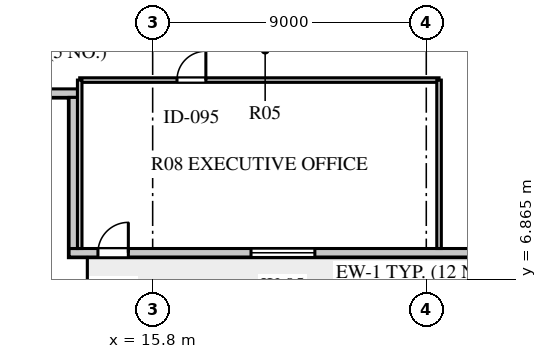
"""IFC4 building model, lengths in metres.
Left out: names, types, materials, properties, quantities, classifications, styles, units other than length and angle.
Written with IfcOpenShell. Run it as: python <this file> out.ifc"""

import sys

from ifc_helpers import new_model, si_unit, direction, frame, frame_2d, origin, place, context, subcontext, project, spatial, rectangle, extrude, element, fill, save


model = new_model("IFC4")
c1 = context("Model", 3, precision=1e-05, world=origin(), true_north=direction((0.0, 1.0)))
c2 = subcontext(c1, "Body", "Model", "MODEL_VIEW")
j1 = project(units=[si_unit("LENGTHUNIT", "METRE"), si_unit("PLANEANGLEUNIT", "RADIAN")], contexts=[c1])
p1 = place(None, origin())
s1 = spatial("IfcSite", under=j1, at=p1, CompositionType="ELEMENT")
p2 = place(p1, origin())
s2 = spatial("IfcBuilding", under=s1, at=p2, CompositionType="ELEMENT")
p3 = place(p2, frame((0.0, 0.0, 237.5)))
s3 = spatial("IfcBuildingStorey", under=s2, at=p3, CompositionType="ELEMENT", Elevation=237.5)
p4 = place(p3, frame((13.05, 7.74, 0.0), z_axis=(0.0, 0.0, 1.0), x_axis=(1.0, 0.0, 0.0)))
e1 = element("IfcWall", 1, at=p4, inside=s3, PredefinedType="STANDARD", context=c2, shape_type="SweptSolid", body=[
    extrude(rectangle(XDim=32.5, YDim=0.28, at=frame_2d((16.25, 0.0))), origin(), (0.0, 0.0, 1.0), 3.66),
])
p5 = place(p4, frame((0.95, 0.0, 0.0)))
e2 = element("IfcOpeningElement", 2, at=p5, cuts=e1, PredefinedType="OPENING", context=c2, shape_type="SweptSolid", body=[
    extrude(rectangle(XDim=1.0, YDim=2.05, at=frame_2d((0.5, 1.025))), frame((0.0, 0.15, 0.0), z_axis=(0.0, -1.0, 0.0), x_axis=(1.0, 0.0, 0.0)), (0.0, 0.0, 1.0), 0.3),
])
p6 = place(p4, frame((5.985, 0.0, 0.8)))
e3 = element("IfcOpeningElement", 3, at=p6, cuts=e1, PredefinedType="OPENING", context=c2, shape_type="SweptSolid", body=[
    extrude(rectangle(XDim=2.1, YDim=1.95, at=frame_2d((1.05, 0.975))), frame((0.0, 0.15, 0.0), z_axis=(0.0, -1.0, 0.0), x_axis=(1.0, 0.0, 0.0)), (0.0, 0.0, 1.0), 0.3),
])
p7 = place(p4, frame((14.877, 0.0, 0.8)))
e4 = element("IfcOpeningElement", 4, at=p7, cuts=e1, PredefinedType="OPENING", context=c2, shape_type="SweptSolid", body=[
    extrude(rectangle(XDim=1.35, YDim=1.9, at=frame_2d((0.675, 0.95))), frame((0.0, 0.15, 0.0), z_axis=(0.0, -1.0, 0.0), x_axis=(1.0, 0.0, 0.0)), (0.0, 0.0, 1.0), 0.3),
])
p8 = place(p4, frame((20.763, 0.0, 0.8)))
e5 = element("IfcOpeningElement", 5, at=p8, cuts=e1, PredefinedType="OPENING", context=c2, shape_type="SweptSolid", body=[
    extrude(rectangle(XDim=1.65, YDim=1.95, at=frame_2d((0.825, 0.975))), frame((0.0, 0.15, 0.0), z_axis=(0.0, -1.0, 0.0), x_axis=(1.0, 0.0, 0.0)), (0.0, 0.0, 1.0), 0.3),
])
p9 = place(p4, frame((28.27, 0.0, 0.8)))
e6 = element("IfcOpeningElement", 6, at=p9, cuts=e1, PredefinedType="OPENING", context=c2, shape_type="SweptSolid", body=[
    extrude(rectangle(XDim=1.95, YDim=2.0, at=frame_2d((0.975, 1.0))), frame((0.0, 0.15, 0.0), z_axis=(0.0, -1.0, 0.0), x_axis=(1.0, 0.0, 0.0)), (0.0, 0.0, 1.0), 0.3),
])
p10 = place(p3, frame((7.8, 12.99, 0.0), z_axis=(0.0, 0.0, 1.0), x_axis=(1.0, 0.0, 0.0)))
e7 = element("IfcWall", 7, at=p10, inside=s3, PredefinedType="STANDARD", context=c2, shape_type="SweptSolid", body=[
    extrude(rectangle(XDim=5.53, YDim=0.28, at=frame_2d((2.765, 0.0))), origin(), (0.0, 0.0, 1.0), 3.66),
])
p11 = place(p3, frame((13.19, 12.85, 0.0), z_axis=(0.0, 0.0, 1.0), x_axis=(0.0, -1.0, 0.0)))
e8 = element("IfcWall", 8, at=p11, inside=s3, PredefinedType="STANDARD", context=c2, shape_type="SweptSolid", body=[
    extrude(rectangle(XDim=4.97, YDim=0.28, at=frame_2d((2.485, 0.0))), origin(), (0.0, 0.0, 1.0), 3.66),
])
p12 = place(p3, frame((13.4, 13.42, 0.0), z_axis=(0.0, 0.0, 1.0), x_axis=(1.0, 0.0, 0.0)))
e9 = element("IfcWall", 9, at=p12, inside=s3, PredefinedType="PARTITIONING", context=c2, shape_type="SweptSolid", body=[
    extrude(rectangle(XDim=11.82, YDim=0.15, at=frame_2d((5.91, 0.0))), origin(), (0.0, 0.0, 1.0), 3.66),
])
p13 = place(p12, frame((3.2, 0.0, 0.0)))
e10 = element("IfcOpeningElement", 10, at=p13, cuts=e9, PredefinedType="OPENING", context=c2, shape_type="SweptSolid", body=[
    extrude(rectangle(XDim=0.95, YDim=2.08, at=frame_2d((0.475, 1.04))), frame((0.0, 0.085, 0.0), z_axis=(0.0, -1.0, 0.0), x_axis=(1.0, 0.0, 0.0)), (0.0, 0.0, 1.0), 0.17),
])
p14 = place(p3, frame((13.4, 7.88, 0.0), z_axis=(0.0, 0.0, 1.0), x_axis=(0.0, 1.0, 0.0)))
e11 = element("IfcWall", 11, at=p14, inside=s3, PredefinedType="PARTITIONING", context=c2, shape_type="SweptSolid", body=[
    extrude(rectangle(XDim=5.54, YDim=0.15, at=frame_2d((2.77, 0.0))), origin(), (0.0, 0.0, 1.0), 3.66),
])
p15 = place(p3, frame((25.22, 7.88, 0.0), z_axis=(0.0, 0.0, 1.0), x_axis=(0.0, 1.0, 0.0)))
e12 = element("IfcWall", 12, at=p15, inside=s3, PredefinedType="PARTITIONING", context=c2, shape_type="SweptSolid", body=[
    extrude(rectangle(XDim=5.54, YDim=0.15, at=frame_2d((2.77, 0.0))), origin(), (0.0, 0.0, 1.0), 3.21),
])
p16 = place(p5, frame((1.0, 0.0, 0.0), z_axis=(0.0, 0.0, 1.0), x_axis=(-1.0, 0.0, 0.0)))
e13 = element("IfcDoor", 13, at=p16, inside=s3, OperationType="SINGLE_SWING_LEFT", PredefinedType="DOOR", context=c2, shape_type="SweptSolid", body=[
    extrude(rectangle(XDim=1.0, YDim=2.05, at=frame_2d((0.5, 1.025))), frame((0.0, 0.025, 0.0), z_axis=(0.0, -1.0, 0.0), x_axis=(1.0, 0.0, 0.0)), (0.0, 0.0, 1.0), 0.05),
])
fill(e2, e13)
p17 = place(p6, origin())
e14 = element("IfcWindow", 14, at=p17, inside=s3, PartitioningType="SINGLE_PANEL", PredefinedType="WINDOW", context=c2, shape_type="SweptSolid", body=[
    extrude(rectangle(XDim=2.1, YDim=1.95, at=frame_2d((1.05, 0.975))), frame((0.0, 0.03, 0.0), z_axis=(0.0, -1.0, 0.0), x_axis=(1.0, 0.0, 0.0)), (0.0, 0.0, 1.0), 0.06),
])
fill(e3, e14)
p18 = place(p13, frame((0.95, 0.0, 0.0), z_axis=(0.0, 0.0, 1.0), x_axis=(-1.0, 0.0, 0.0)))
e15 = element("IfcDoor", 15, at=p18, inside=s3, OperationType="SINGLE_SWING_LEFT", PredefinedType="DOOR", context=c2, shape_type="SweptSolid", body=[
    extrude(rectangle(XDim=0.95, YDim=2.08, at=frame_2d((0.475, 1.04))), frame((0.0, 0.025, 0.0), z_axis=(0.0, -1.0, 0.0), x_axis=(1.0, 0.0, 0.0)), (0.0, 0.0, 1.0), 0.05),
])
fill(e10, e15)
save(model, sys.argv[1])
